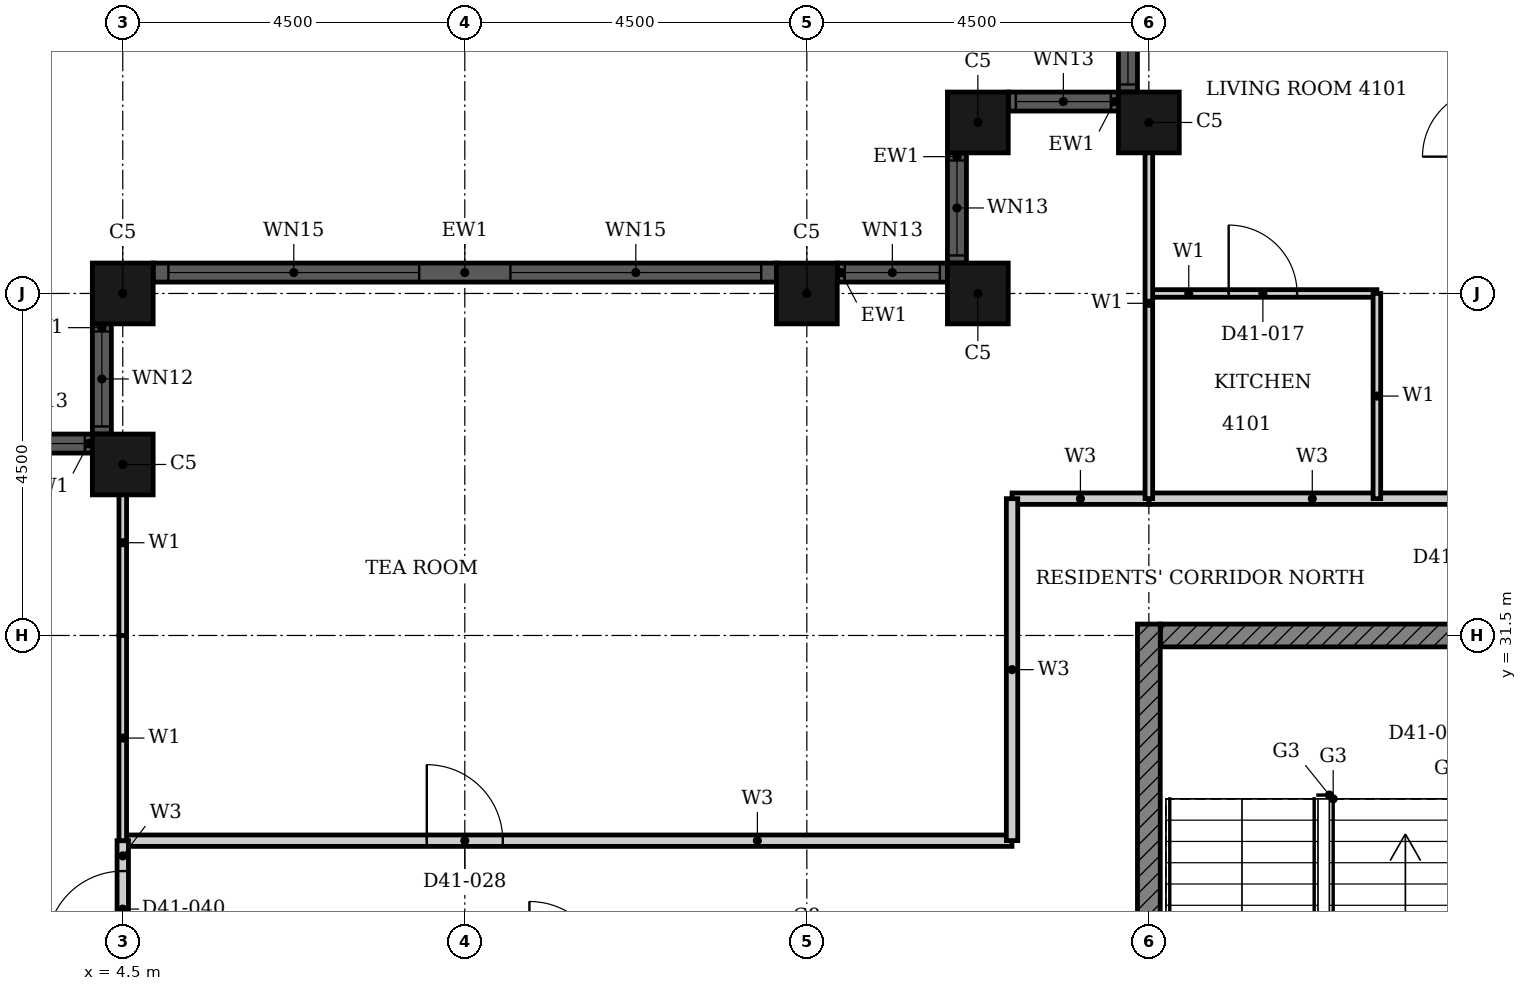
"""IFC4 building model, lengths in metres.
Left out: names, types, materials, properties, quantities, classifications, styles, units other than length and angle.
Written with IfcOpenShell. Run it as: python <this file> out.ifc"""

import sys

from ifc_helpers import new_model, si_unit, direction, frame, frame_2d, origin, origin_2d, place, context, subcontext, project, spatial, rectangle, hollow_rectangle, extrude, element, fill, save


model = new_model("IFC4")
c1 = context("Model", 3, precision=1e-05, world=origin(), true_north=direction((0.0, 1.0)))
c2 = subcontext(c1, "Body", "Model", "MODEL_VIEW")
j1 = project(units=[si_unit("LENGTHUNIT", "METRE"), si_unit("PLANEANGLEUNIT", "RADIAN")], contexts=[c1])
p1 = place(None, origin())
s1 = spatial("IfcSite", under=j1, at=p1, CompositionType="ELEMENT")
p2 = place(p1, origin())
s2 = spatial("IfcBuilding", under=s1, at=p2, CompositionType="ELEMENT")
p3 = place(p2, frame((0.0, 0.0, 165.4)))
s3 = spatial("IfcBuildingStorey", under=s2, at=p3, CompositionType="ELEMENT", Elevation=165.4)
for number, where, z_axis, x_axis in (
    (1, (18.0, 38.25, 0.0), (0.0, 0.0, 1.0), (1.0, 0.0, 0.0)),
    (2, (15.75, 38.25, 0.0), (0.0, 0.0, 1.0), (1.0, 0.0, 0.0)),
    (3, (15.75, 36.0, 0.0), (0.0, 0.0, 1.0), (1.0, 0.0, 0.0)),
    (4, (13.5, 36.0, 0.0), (0.0, 0.0, 1.0), (1.0, 0.0, 0.0)),
    (5, (4.5, 36.0, 0.0), (0.0, 0.0, 1.0), (1.0, 0.0, 0.0)),
    (6, (4.5, 33.75, 0.0), (0.0, 0.0, 1.0), (1.0, 0.0, 0.0)),
):
    element("IfcColumn", number, at=place(p3, frame(where, z_axis=z_axis, x_axis=x_axis)), inside=s3, PredefinedType="COLUMN", context=c2, shape_type="SweptSolid", body=[
        extrude(hollow_rectangle(XDim=0.8, YDim=0.8, WallThickness=0.025, at=origin_2d()), origin(), (0.0, 0.0, 1.0), 3.7),
    ])
p4 = place(p3, frame((17.725, 40.1, 0.0), z_axis=(0.0, 0.0, 1.0), x_axis=(0.0, -1.0, 0.0)))
e7 = element("IfcWall", 7, at=p4, inside=s3, PredefinedType="SOLIDWALL", context=c2, shape_type="SweptSolid", body=[
    extrude(rectangle(XDim=1.45, YDim=0.25, at=frame_2d((0.725, 0.0))), origin(), (0.0, 0.0, 1.0), 3.7),
])
p5 = place(p4, frame((0.1, 0.0, 0.9)))
e8 = element("IfcOpeningElement", 8, at=p5, cuts=e7, PredefinedType="OPENING", context=c2, shape_type="SweptSolid", body=[
    extrude(rectangle(XDim=1.25, YDim=1.85, at=frame_2d((0.625, 0.925))), frame((0.0, 0.135, 0.0), z_axis=(0.0, -1.0, 0.0), x_axis=(1.0, 0.0, 0.0)), (0.0, 0.0, 1.0), 0.27),
])
p6 = place(p3, frame((17.6, 38.525, 0.0), z_axis=(0.0, 0.0, 1.0), x_axis=(-1.0, 0.0, 0.0)))
e9 = element("IfcWall", 9, at=p6, inside=s3, PredefinedType="SOLIDWALL", context=c2, shape_type="SweptSolid", body=[
    extrude(rectangle(XDim=1.45, YDim=0.25, at=frame_2d((0.725, 0.0))), origin(), (0.0, 0.0, 1.0), 3.7),
])
p7 = place(p6, frame((0.1, 0.0, 0.9)))
e10 = element("IfcOpeningElement", 10, at=p7, cuts=e9, PredefinedType="OPENING", context=c2, shape_type="SweptSolid", body=[
    extrude(rectangle(XDim=1.25, YDim=1.85, at=frame_2d((0.625, 0.925))), frame((0.0, 0.135, 0.0), z_axis=(0.0, -1.0, 0.0), x_axis=(1.0, 0.0, 0.0)), (0.0, 0.0, 1.0), 0.27),
])
p8 = place(p3, frame((15.475, 37.85, 0.0), z_axis=(0.0, 0.0, 1.0), x_axis=(0.0, -1.0, 0.0)))
e11 = element("IfcWall", 11, at=p8, inside=s3, PredefinedType="SOLIDWALL", context=c2, shape_type="SweptSolid", body=[
    extrude(rectangle(XDim=1.45, YDim=0.25, at=frame_2d((0.725, 0.0))), origin(), (0.0, 0.0, 1.0), 3.7),
])
p9 = place(p8, frame((0.1, 0.0, 0.9)))
e12 = element("IfcOpeningElement", 12, at=p9, cuts=e11, PredefinedType="OPENING", context=c2, shape_type="SweptSolid", body=[
    extrude(rectangle(XDim=1.25, YDim=1.85, at=frame_2d((0.625, 0.925))), frame((0.0, 0.135, 0.0), z_axis=(0.0, -1.0, 0.0), x_axis=(1.0, 0.0, 0.0)), (0.0, 0.0, 1.0), 0.27),
])
p10 = place(p3, frame((15.35, 36.275, 0.0), z_axis=(0.0, 0.0, 1.0), x_axis=(-1.0, 0.0, 0.0)))
e13 = element("IfcWall", 13, at=p10, inside=s3, PredefinedType="SOLIDWALL", context=c2, shape_type="SweptSolid", body=[
    extrude(rectangle(XDim=1.45, YDim=0.25, at=frame_2d((0.725, 0.0))), origin(), (0.0, 0.0, 1.0), 3.7),
])
p11 = place(p10, frame((0.1, 0.0, 0.9)))
e14 = element("IfcOpeningElement", 14, at=p11, cuts=e13, PredefinedType="OPENING", context=c2, shape_type="SweptSolid", body=[
    extrude(rectangle(XDim=1.25, YDim=1.85, at=frame_2d((0.625, 0.925))), frame((0.0, 0.135, 0.0), z_axis=(0.0, -1.0, 0.0), x_axis=(1.0, 0.0, 0.0)), (0.0, 0.0, 1.0), 0.27),
])
p12 = place(p3, frame((13.1, 36.275, 0.0), z_axis=(0.0, 0.0, 1.0), x_axis=(-1.0, 0.0, 0.0)))
e15 = element("IfcWall", 15, at=p12, inside=s3, PredefinedType="SOLIDWALL", context=c2, shape_type="SweptSolid", body=[
    extrude(rectangle(XDim=8.2, YDim=0.25, at=frame_2d((4.1, 0.0))), origin(), (0.0, 0.0, 1.0), 3.7),
])
p13 = place(p12, frame((0.2, 0.0, 0.45)))
e16 = element("IfcOpeningElement", 16, at=p13, cuts=e15, PredefinedType="OPENING", context=c2, shape_type="SweptSolid", body=[
    extrude(rectangle(XDim=3.3, YDim=2.3, at=frame_2d((1.65, 1.15))), frame((0.0, 0.135, 0.0), z_axis=(0.0, -1.0, 0.0), x_axis=(1.0, 0.0, 0.0)), (0.0, 0.0, 1.0), 0.27),
])
p14 = place(p12, frame((4.7, 0.0, 0.45)))
e17 = element("IfcOpeningElement", 17, at=p14, cuts=e15, PredefinedType="OPENING", context=c2, shape_type="SweptSolid", body=[
    extrude(rectangle(XDim=3.3, YDim=2.3, at=frame_2d((1.65, 1.15))), frame((0.0, 0.135, 0.0), z_axis=(0.0, -1.0, 0.0), x_axis=(1.0, 0.0, 0.0)), (0.0, 0.0, 1.0), 0.27),
])
p15 = place(p3, frame((4.225, 35.6, 0.0), z_axis=(0.0, 0.0, 1.0), x_axis=(0.0, -1.0, 0.0)))
e18 = element("IfcWall", 18, at=p15, inside=s3, PredefinedType="SOLIDWALL", context=c2, shape_type="SweptSolid", body=[
    extrude(rectangle(XDim=1.45, YDim=0.25, at=frame_2d((0.725, 0.0))), origin(), (0.0, 0.0, 1.0), 3.7),
])
p16 = place(p15, frame((0.1, 0.0, 0.9)))
e19 = element("IfcOpeningElement", 19, at=p16, cuts=e18, PredefinedType="OPENING", context=c2, shape_type="SweptSolid", body=[
    extrude(rectangle(XDim=1.25, YDim=2.08, at=frame_2d((0.625, 1.04))), frame((0.0, 0.135, 0.0), z_axis=(0.0, -1.0, 0.0), x_axis=(1.0, 0.0, 0.0)), (0.0, 0.0, 1.0), 0.27),
])
p17 = place(p3, frame((4.1, 34.025, 0.0), z_axis=(0.0, 0.0, 1.0), x_axis=(-1.0, 0.0, 0.0)))
e20 = element("IfcWall", 20, at=p17, inside=s3, PredefinedType="SOLIDWALL", context=c2, shape_type="SweptSolid", body=[
    extrude(rectangle(XDim=1.45, YDim=0.25, at=frame_2d((0.725, 0.0))), origin(), (0.0, 0.0, 1.0), 3.7),
])
p18 = place(p17, frame((0.1, 0.0, 0.9)))
e21 = element("IfcOpeningElement", 21, at=p18, cuts=e20, PredefinedType="OPENING", context=c2, shape_type="SweptSolid", body=[
    extrude(rectangle(XDim=1.25, YDim=1.85, at=frame_2d((0.625, 0.925))), frame((0.0, 0.135, 0.0), z_axis=(0.0, -1.0, 0.0), x_axis=(1.0, 0.0, 0.0)), (0.0, 0.0, 1.0), 0.27),
])
p19 = place(p3, frame((18.15, 31.5, 0.0), z_axis=(0.0, 0.0, 1.0), x_axis=(1.0, 0.0, 0.0)))
e22 = element("IfcWall", 22, at=p19, inside=s3, PredefinedType="SHEAR", context=c2, shape_type="SweptSolid", body=[
    extrude(rectangle(XDim=9.368, YDim=0.3, at=frame_2d((4.684, 0.0))), origin(), (0.0, 0.0, 1.0), 3.4),
])
p20 = place(p19, frame((4.736, 0.0, 0.0)))
e23 = element("IfcOpeningElement", 23, at=p20, cuts=e22, PredefinedType="OPENING", context=c2, shape_type="SweptSolid", body=[
    extrude(rectangle(XDim=1.8, YDim=2.1, at=frame_2d((0.9, 1.05))), frame((0.0, 0.16, 0.0), z_axis=(0.0, -1.0, 0.0), x_axis=(1.0, 0.0, 0.0)), (0.0, 0.0, 1.0), 0.32),
])
p21 = place(p3, frame((18.0, 22.35, 0.0), z_axis=(0.0, 0.0, 1.0), x_axis=(0.0, 1.0, 0.0)))
e24 = element("IfcWall", 24, at=p21, inside=s3, PredefinedType="SHEAR", context=c2, shape_type="SweptSolid", body=[
    extrude(rectangle(XDim=9.3, YDim=0.3, at=frame_2d((4.65, 0.0))), origin(), (0.0, 0.0, 1.0), 3.4),
])
p22 = place(p3, frame((4.5, 28.8, 0.0), z_axis=(0.0, 0.0, 1.0), x_axis=(1.0, 0.0, 0.0)))
e25 = element("IfcWall", 25, at=p22, inside=s3, PredefinedType="PARTITIONING", context=c2, shape_type="SweptSolid", body=[
    extrude(rectangle(XDim=11.699, YDim=0.15, at=frame_2d((5.85, 0.0))), origin(), (0.0, 0.0, 1.0), 3.4),
])
p23 = place(p22, frame((4.0, 0.0, 0.0)))
e26 = element("IfcOpeningElement", 26, at=p23, cuts=e25, PredefinedType="OPENING", context=c2, shape_type="SweptSolid", body=[
    extrude(rectangle(XDim=1.0, YDim=2.1, at=frame_2d((0.5, 1.05))), frame((0.0, 0.085, 0.0), z_axis=(0.0, -1.0, 0.0), x_axis=(1.0, 0.0, 0.0)), (0.0, 0.0, 1.0), 0.17),
])
p24 = place(p3, frame((18.0, 33.3, 0.0), z_axis=(0.0, 0.0, 1.0), x_axis=(1.0, 0.0, 0.0)))
e27 = element("IfcWall", 27, at=p24, inside=s3, PredefinedType="PARTITIONING", context=c2, shape_type="SweptSolid", body=[
    extrude(rectangle(XDim=6.6, YDim=0.15, at=frame_2d((3.3, 0.0))), origin(), (0.0, 0.0, 1.0), 3.4),
])
p25 = place(p24, frame((4.3, 0.0, 0.0)))
e28 = element("IfcOpeningElement", 28, at=p25, cuts=e27, PredefinedType="OPENING", context=c2, shape_type="SweptSolid", body=[
    extrude(rectangle(XDim=1.0, YDim=2.2, at=frame_2d((0.5, 1.1))), frame((0.0, 0.085, 0.0), z_axis=(0.0, -1.0, 0.0), x_axis=(1.0, 0.0, 0.0)), (0.0, 0.0, 1.0), 0.17),
])
p26 = place(p3, frame((16.2, 33.3, 0.0), z_axis=(0.0, 0.0, 1.0), x_axis=(1.0, 0.0, 0.0)))
e29 = element("IfcWall", 29, at=p26, inside=s3, PredefinedType="PARTITIONING", context=c2, shape_type="SweptSolid", body=[
    extrude(rectangle(XDim=1.799, YDim=0.15, at=frame_2d((0.899, 0.0))), origin(), (0.0, 0.0, 1.0), 3.4),
])
p27 = place(p3, frame((16.2, 28.801, 0.0), z_axis=(0.0, 0.0, 1.0), x_axis=(0.0, 1.0, 0.0)))
e30 = element("IfcWall", 30, at=p27, inside=s3, PredefinedType="PARTITIONING", context=c2, shape_type="SweptSolid", body=[
    extrude(rectangle(XDim=4.499, YDim=0.15, at=frame_2d((2.25, 0.0))), origin(), (0.0, 0.0, 1.0), 3.4),
])
p28 = place(p3, frame((4.5, 27.0, 0.0), z_axis=(0.0, 0.0, 1.0), x_axis=(0.0, 1.0, 0.0)))
e31 = element("IfcWall", 31, at=p28, inside=s3, PredefinedType="PARTITIONING", context=c2, shape_type="SweptSolid", body=[
    extrude(rectangle(XDim=1.8, YDim=0.15, at=frame_2d((0.9, 0.0))), origin(), (0.0, 0.0, 1.0), 3.4),
])
p29 = place(p28, frame((0.4, 0.0, 0.0)))
e32 = element("IfcOpeningElement", 32, at=p29, cuts=e31, PredefinedType="OPENING", context=c2, shape_type="SweptSolid", body=[
    extrude(rectangle(XDim=1.0, YDim=2.2, at=frame_2d((0.5, 1.1))), frame((0.0, 0.085, 0.0), z_axis=(0.0, -1.0, 0.0), x_axis=(1.0, 0.0, 0.0)), (0.0, 0.0, 1.0), 0.17),
])
p30 = place(p3, frame((18.0, 36.0, 0.0), z_axis=(0.0, 0.0, 1.0), x_axis=(1.0, 0.0, 0.0)))
e33 = element("IfcWall", 33, at=p30, inside=s3, PredefinedType="PARTITIONING", context=c2, shape_type="SweptSolid", body=[
    extrude(rectangle(XDim=3.0, YDim=0.1, at=frame_2d((1.5, 0.0))), origin(), (0.0, 0.0, 1.0), 3.4),
])
p31 = place(p30, frame((1.05, 0.0, 0.0)))
e34 = element("IfcOpeningElement", 34, at=p31, cuts=e33, PredefinedType="OPENING", context=c2, shape_type="SweptSolid", body=[
    extrude(rectangle(XDim=0.9, YDim=2.1, at=frame_2d((0.45, 1.05))), frame((0.0, 0.06, 0.0), z_axis=(0.0, -1.0, 0.0), x_axis=(1.0, 0.0, 0.0)), (0.0, 0.0, 1.0), 0.12),
])
p32 = place(p3, frame((18.0, 33.301, 0.0), z_axis=(0.0, 0.0, 1.0), x_axis=(0.0, 1.0, 0.0)))
e35 = element("IfcWall", 35, at=p32, inside=s3, PredefinedType="PARTITIONING", context=c2, shape_type="SweptSolid", body=[
    extrude(rectangle(XDim=5.139, YDim=0.1, at=frame_2d((2.569, 0.0))), origin(), (0.0, 0.0, 1.0), 3.4),
])
for number, where, z_axis, x_axis in (
    (36, (21.0, 33.3, 0.0), (0.0, 0.0, 1.0), (0.0, 1.0, 0.0)),
    (37, (4.5, 28.8, 0.0), (0.0, 0.0, 1.0), (0.0, 1.0, 0.0)),
):
    element("IfcWall", number, at=place(p3, frame(where, z_axis=z_axis, x_axis=x_axis)), inside=s3, PredefinedType="PARTITIONING", context=c2, shape_type="SweptSolid", body=[
        extrude(rectangle(XDim=2.7, YDim=0.1, at=frame_2d((1.35, 0.0))), origin(), (0.0, 0.0, 1.0), 3.4),
    ])
p33 = place(p3, frame((4.5, 31.501, 0.0), z_axis=(0.0, 0.0, 1.0), x_axis=(0.0, 1.0, 0.0)))
e38 = element("IfcWall", 38, at=p33, inside=s3, PredefinedType="PARTITIONING", context=c2, shape_type="SweptSolid", body=[
    extrude(rectangle(XDim=2.439, YDim=0.1, at=frame_2d((1.219, 0.0))), origin(), (0.0, 0.0, 1.0), 3.4),
])
p34 = place(p5, origin())
e39 = element("IfcWindow", 39, at=p34, inside=s3, PartitioningType="SINGLE_PANEL", PredefinedType="WINDOW", context=c2, shape_type="SweptSolid", body=[
    extrude(rectangle(XDim=1.25, YDim=1.85, at=frame_2d((0.625, 0.925))), frame((0.0, 0.03, 0.0), z_axis=(0.0, -1.0, 0.0), x_axis=(1.0, 0.0, 0.0)), (0.0, 0.0, 1.0), 0.06),
])
fill(e8, e39)
p35 = place(p7, origin())
e40 = element("IfcWindow", 40, at=p35, inside=s3, PartitioningType="SINGLE_PANEL", PredefinedType="WINDOW", context=c2, shape_type="SweptSolid", body=[
    extrude(rectangle(XDim=1.25, YDim=1.85, at=frame_2d((0.625, 0.925))), frame((0.0, 0.03, 0.0), z_axis=(0.0, -1.0, 0.0), x_axis=(1.0, 0.0, 0.0)), (0.0, 0.0, 1.0), 0.06),
])
fill(e10, e40)
p36 = place(p9, origin())
e41 = element("IfcWindow", 41, at=p36, inside=s3, PartitioningType="SINGLE_PANEL", PredefinedType="WINDOW", context=c2, shape_type="SweptSolid", body=[
    extrude(rectangle(XDim=1.25, YDim=1.85, at=frame_2d((0.625, 0.925))), frame((0.0, 0.03, 0.0), z_axis=(0.0, -1.0, 0.0), x_axis=(1.0, 0.0, 0.0)), (0.0, 0.0, 1.0), 0.06),
])
fill(e12, e41)
p37 = place(p11, origin())
e42 = element("IfcWindow", 42, at=p37, inside=s3, PartitioningType="SINGLE_PANEL", PredefinedType="WINDOW", context=c2, shape_type="SweptSolid", body=[
    extrude(rectangle(XDim=1.25, YDim=1.85, at=frame_2d((0.625, 0.925))), frame((0.0, 0.03, 0.0), z_axis=(0.0, -1.0, 0.0), x_axis=(1.0, 0.0, 0.0)), (0.0, 0.0, 1.0), 0.06),
])
fill(e14, e42)
p38 = place(p13, origin())
e43 = element("IfcWindow", 43, at=p38, inside=s3, PartitioningType="SINGLE_PANEL", PredefinedType="WINDOW", context=c2, shape_type="SweptSolid", body=[
    extrude(rectangle(XDim=3.3, YDim=2.3, at=frame_2d((1.65, 1.15))), frame((0.0, 0.03, 0.0), z_axis=(0.0, -1.0, 0.0), x_axis=(1.0, 0.0, 0.0)), (0.0, 0.0, 1.0), 0.06),
])
fill(e16, e43)
p39 = place(p14, origin())
e44 = element("IfcWindow", 44, at=p39, inside=s3, PartitioningType="SINGLE_PANEL", PredefinedType="WINDOW", context=c2, shape_type="SweptSolid", body=[
    extrude(rectangle(XDim=3.3, YDim=2.3, at=frame_2d((1.65, 1.15))), frame((0.0, 0.03, 0.0), z_axis=(0.0, -1.0, 0.0), x_axis=(1.0, 0.0, 0.0)), (0.0, 0.0, 1.0), 0.06),
])
fill(e17, e44)
p40 = place(p16, origin())
e45 = element("IfcWindow", 45, at=p40, inside=s3, PartitioningType="SINGLE_PANEL", PredefinedType="WINDOW", context=c2, shape_type="SweptSolid", body=[
    extrude(rectangle(XDim=1.25, YDim=2.08, at=frame_2d((0.625, 1.04))), frame((0.0, 0.03, 0.0), z_axis=(0.0, -1.0, 0.0), x_axis=(1.0, 0.0, 0.0)), (0.0, 0.0, 1.0), 0.06),
])
fill(e19, e45)
p41 = place(p18, origin())
e46 = element("IfcWindow", 46, at=p41, inside=s3, PartitioningType="SINGLE_PANEL", PredefinedType="WINDOW", context=c2, shape_type="SweptSolid", body=[
    extrude(rectangle(XDim=1.25, YDim=1.85, at=frame_2d((0.625, 0.925))), frame((0.0, 0.03, 0.0), z_axis=(0.0, -1.0, 0.0), x_axis=(1.0, 0.0, 0.0)), (0.0, 0.0, 1.0), 0.06),
])
fill(e21, e46)
p42 = place(p31, origin())
e47 = element("IfcDoor", 47, at=p42, inside=s3, OperationType="SINGLE_SWING_LEFT", PredefinedType="DOOR", context=c2, shape_type="SweptSolid", body=[
    extrude(rectangle(XDim=0.9, YDim=2.1, at=frame_2d((0.45, 1.05))), frame((0.0, 0.025, 0.0), z_axis=(0.0, -1.0, 0.0), x_axis=(1.0, 0.0, 0.0)), (0.0, 0.0, 1.0), 0.05),
])
fill(e34, e47)
p43 = place(p23, origin())
e48 = element("IfcDoor", 48, at=p43, inside=s3, OperationType="SINGLE_SWING_LEFT", PredefinedType="DOOR", context=c2, shape_type="SweptSolid", body=[
    extrude(rectangle(XDim=1.0, YDim=2.1, at=frame_2d((0.5, 1.05))), frame((0.0, 0.025, 0.0), z_axis=(0.0, -1.0, 0.0), x_axis=(1.0, 0.0, 0.0)), (0.0, 0.0, 1.0), 0.05),
])
fill(e26, e48)
p44 = place(p29, origin())
e49 = element("IfcDoor", 49, at=p44, inside=s3, OperationType="SINGLE_SWING_LEFT", PredefinedType="DOOR", context=c2, shape_type="SweptSolid", body=[
    extrude(rectangle(XDim=1.0, YDim=2.2, at=frame_2d((0.5, 1.1))), frame((0.0, 0.025, 0.0), z_axis=(0.0, -1.0, 0.0), x_axis=(1.0, 0.0, 0.0)), (0.0, 0.0, 1.0), 0.05),
])
fill(e32, e49)
save(model, sys.argv[1])
